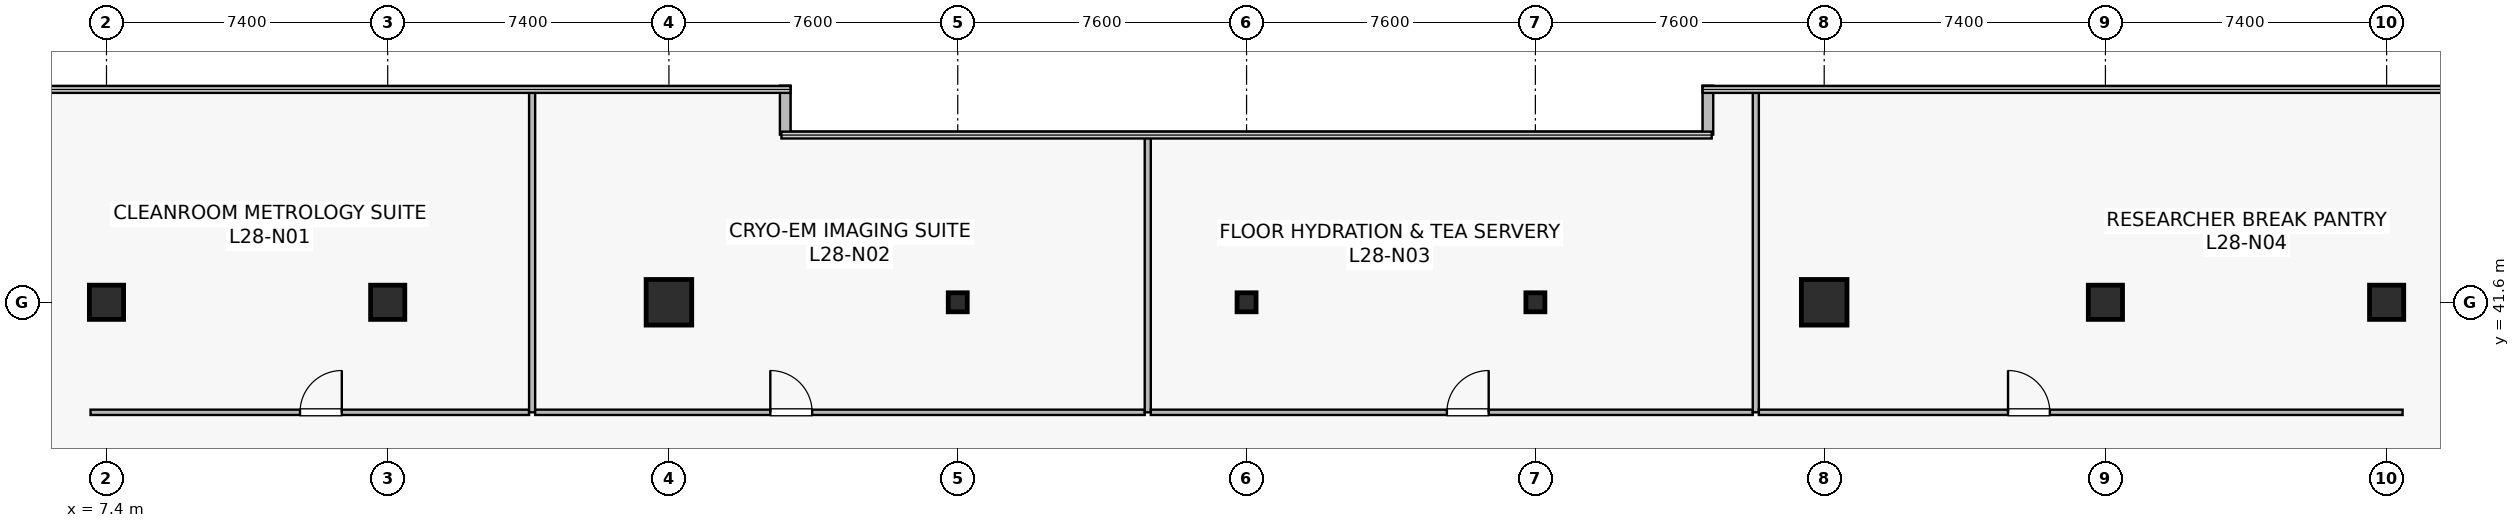
"""IFC4 building model, lengths in metres.
Left out: names, types, materials, properties, quantities, classifications, styles, units other than length and angle.
Written with IfcOpenShell. Run it as: python <this file> out.ifc"""

import sys

from ifc_helpers import new_model, si_unit, direction, frame, frame_2d, origin, origin_2d, place, context, subcontext, project, spatial, rectangle, hollow_rectangle, extrude, source, transform, mapped, element, fill, save


model = new_model("IFC4")
c1 = context("Model", 3, precision=1e-05, world=origin(), true_north=direction((0.0, 1.0)))
c2 = subcontext(c1, "Body", "Model", "MODEL_VIEW")
j1 = project(units=[si_unit("LENGTHUNIT", "METRE"), si_unit("PLANEANGLEUNIT", "RADIAN")], contexts=[c1])
p1 = place(None, origin())
s1 = spatial("IfcSite", under=j1, at=p1, CompositionType="ELEMENT")
p2 = place(p1, origin())
s2 = spatial("IfcBuilding", under=s1, at=p2, CompositionType="ELEMENT")
p3 = place(p2, frame((0.0, 0.0, 117.4)))
s3 = spatial("IfcBuildingStorey", under=s2, at=p3, CompositionType="ELEMENT", Elevation=117.4)
m1 = source(origin(), c2, "Body", "SweptSolid", [
    extrude(rectangle(XDim=0.9, YDim=0.9, at=origin_2d()), origin(), (0.0, 0.0, 1.0), 4.1),
])
p4 = place(p3, frame((14.8, 41.6, 0.0), z_axis=(0.0, 0.0, 1.0), x_axis=(1.0, 0.0, 0.0)))
e1 = element("IfcColumn", 1, at=p4, inside=s3, PredefinedType="COLUMN", context=c2, shape_type="MappedRepresentation", body=[
    mapped(m1, transform((0.0, 0.0, 0.0), scale=1.0)),
])
m2 = source(origin(), c2, "Body", "SweptSolid", [
    extrude(rectangle(XDim=1.2, YDim=1.2, at=origin_2d()), origin(), (0.0, 0.0, 1.0), 4.1),
])
for number, where, z_axis, x_axis in (
    (2, (22.2, 41.6, 0.0), (0.0, 0.0, 1.0), (1.0, 0.0, 0.0)),
    (3, (52.6, 41.6, 0.0), (0.0, 0.0, 1.0), (1.0, 0.0, 0.0)),
):
    element("IfcColumn", number, at=place(p3, frame(where, z_axis=z_axis, x_axis=x_axis)), inside=s3, PredefinedType="COLUMN", context=c2, shape_type="MappedRepresentation", body=[
        mapped(m2, transform((0.0, 0.0, 0.0), scale=1.0)),
    ])
for number, where, z_axis, x_axis in (
    (4, (60.0, 41.6, 0.0), (0.0, 0.0, 1.0), (1.0, 0.0, 0.0)),
    (5, (7.4, 41.6, 0.0), (0.0, 0.0, 1.0), (1.0, 0.0, 0.0)),
    (6, (67.4, 41.6, 0.0), (0.0, 0.0, 1.0), (1.0, 0.0, 0.0)),
):
    element("IfcColumn", number, at=place(p3, frame(where, z_axis=z_axis, x_axis=x_axis)), inside=s3, PredefinedType="COLUMN", context=c2, shape_type="MappedRepresentation", body=[
        mapped(m1, transform((0.0, 0.0, 0.0), scale=1.0)),
    ])
m3 = source(origin(), c2, "Body", "SweptSolid", [
    extrude(hollow_rectangle(XDim=0.5, YDim=0.5, WallThickness=0.022, at=origin_2d()), origin(), (0.0, 0.0, 1.0), 4.1),
])
for number, where, z_axis, x_axis in (
    (7, (29.8, 41.6, 0.0), (0.0, 0.0, 1.0), (1.0, 0.0, 0.0)),
    (8, (37.4, 41.6, 0.0), (0.0, 0.0, 1.0), (1.0, 0.0, 0.0)),
    (9, (45.0, 41.6, 0.0), (0.0, 0.0, 1.0), (1.0, 0.0, 0.0)),
):
    element("IfcColumn", number, at=place(p3, frame(where, z_axis=z_axis, x_axis=x_axis)), inside=s3, PredefinedType="COLUMN", context=c2, shape_type="MappedRepresentation", body=[
        mapped(m3, transform((0.0, 0.0, 0.0), scale=1.0)),
    ])
for number, where, z_axis, x_axis in (
    (10, (49.54, 47.3, 0.0), (0.0, 0.0, 1.0), (0.0, -1.0, 0.0)),
    (11, (25.26, 46.012, 0.0), (0.0, 0.0, 1.0), (0.0, 1.0, 0.0)),
):
    element("IfcWall", number, at=place(p3, frame(where, z_axis=z_axis, x_axis=x_axis)), inside=s3, PredefinedType="STANDARD", context=c2, shape_type="SweptSolid", body=[
        extrude(rectangle(XDim=1.288, YDim=0.28, at=frame_2d((0.644, 0.0))), origin(), (0.0, 0.0, 1.0), 3.79),
    ])
p5 = place(p3, frame((6.98, 38.705, 0.0), z_axis=(0.0, 0.0, 1.0), x_axis=(1.0, 0.0, 0.0)))
e12 = element("IfcWall", 12, at=p5, inside=s3, PredefinedType="PARTITIONING", context=c2, shape_type="SweptSolid", body=[
    extrude(rectangle(XDim=11.54, YDim=0.14, at=frame_2d((5.77, 0.0))), origin(), (0.0, 0.0, 1.0), 3.125),
])
p6 = place(p5, frame((5.512, 0.0, 0.0)))
e13 = element("IfcOpeningElement", 13, at=p6, cuts=e12, PredefinedType="OPENING", context=c2, shape_type="SweptSolid", body=[
    extrude(rectangle(XDim=1.1, YDim=2.18, at=frame_2d((0.55, 1.09))), frame((0.0, 0.08, 0.0), z_axis=(0.0, -1.0, 0.0), x_axis=(1.0, 0.0, 0.0)), (0.0, 0.0, 1.0), 0.16),
])
p7 = place(p3, frame((18.6, 38.705, 0.0), z_axis=(0.0, 0.0, 1.0), x_axis=(0.0, 1.0, 0.0)))
e14 = element("IfcWall", 14, at=p7, inside=s3, PredefinedType="PARTITIONING", context=c2, shape_type="SweptSolid", body=[
    extrude(rectangle(XDim=8.485, YDim=0.16, at=frame_2d((4.242, 0.0))), origin(), (0.0, 0.0, 1.0), 3.075),
])
p8 = place(p3, frame((18.68, 38.705, 0.0), z_axis=(0.0, 0.0, 1.0), x_axis=(1.0, 0.0, 0.0)))
e15 = element("IfcWall", 15, at=p8, inside=s3, PredefinedType="PARTITIONING", context=c2, shape_type="SweptSolid", body=[
    extrude(rectangle(XDim=16.04, YDim=0.14, at=frame_2d((8.02, 0.0))), origin(), (0.0, 0.0, 1.0), 3.125),
])
p9 = place(p8, frame((6.188, 0.0, 0.0)))
e16 = element("IfcOpeningElement", 16, at=p9, cuts=e15, PredefinedType="OPENING", context=c2, shape_type="SweptSolid", body=[
    extrude(rectangle(XDim=1.1, YDim=2.18, at=frame_2d((0.55, 1.09))), frame((0.0, 0.08, 0.0), z_axis=(0.0, -1.0, 0.0), x_axis=(1.0, 0.0, 0.0)), (0.0, 0.0, 1.0), 0.16),
])
p10 = place(p3, frame((34.8, 38.705, 0.0), z_axis=(0.0, 0.0, 1.0), x_axis=(0.0, 1.0, 0.0)))
e17 = element("IfcWall", 17, at=p10, inside=s3, PredefinedType="PARTITIONING", context=c2, shape_type="SweptSolid", body=[
    extrude(rectangle(XDim=7.285, YDim=0.16, at=frame_2d((3.643, 0.0))), origin(), (0.0, 0.0, 1.0), 3.075),
])
p11 = place(p3, frame((34.88, 38.705, 0.0), z_axis=(0.0, 0.0, 1.0), x_axis=(1.0, 0.0, 0.0)))
e18 = element("IfcWall", 18, at=p11, inside=s3, PredefinedType="PARTITIONING", context=c2, shape_type="SweptSolid", body=[
    extrude(rectangle(XDim=15.84, YDim=0.14, at=frame_2d((7.92, 0.0))), origin(), (0.0, 0.0, 1.0), 3.125),
])
p12 = place(p11, frame((7.791, 0.0, 0.0)))
e19 = element("IfcOpeningElement", 19, at=p12, cuts=e18, PredefinedType="OPENING", context=c2, shape_type="SweptSolid", body=[
    extrude(rectangle(XDim=1.1, YDim=2.18, at=frame_2d((0.55, 1.09))), frame((0.0, 0.08, 0.0), z_axis=(0.0, -1.0, 0.0), x_axis=(1.0, 0.0, 0.0)), (0.0, 0.0, 1.0), 0.16),
])
p13 = place(p3, frame((50.8, 38.705, 0.0), z_axis=(0.0, 0.0, 1.0), x_axis=(0.0, 1.0, 0.0)))
e20 = element("IfcWall", 20, at=p13, inside=s3, PredefinedType="PARTITIONING", context=c2, shape_type="SweptSolid", body=[
    extrude(rectangle(XDim=8.485, YDim=0.16, at=frame_2d((4.242, 0.0))), origin(), (0.0, 0.0, 1.0), 3.075),
])
p14 = place(p3, frame((50.88, 38.705, 0.0), z_axis=(0.0, 0.0, 1.0), x_axis=(1.0, 0.0, 0.0)))
e21 = element("IfcWall", 21, at=p14, inside=s3, PredefinedType="PARTITIONING", context=c2, shape_type="SweptSolid", body=[
    extrude(rectangle(XDim=16.94, YDim=0.14, at=frame_2d((8.47, 0.0))), origin(), (0.0, 0.0, 1.0), 3.125),
])
p15 = place(p14, frame((6.557, 0.0, 0.0)))
e22 = element("IfcOpeningElement", 22, at=p15, cuts=e21, PredefinedType="OPENING", context=c2, shape_type="SweptSolid", body=[
    extrude(rectangle(XDim=1.1, YDim=2.18, at=frame_2d((0.55, 1.09))), frame((0.0, 0.08, 0.0), z_axis=(0.0, -1.0, 0.0), x_axis=(1.0, 0.0, 0.0)), (0.0, 0.0, 1.0), 0.16),
])
m4 = source(origin(), c2, "Body", "SweptSolid", [
    extrude(rectangle(XDim=1.1, YDim=2.18, at=frame_2d((0.55, 1.09))), frame((0.0, 0.025, 0.0), z_axis=(0.0, -1.0, 0.0), x_axis=(1.0, 0.0, 0.0)), (0.0, 0.0, 1.0), 0.05),
])
p16 = place(p6, origin())
e23 = element("IfcDoor", 23, at=p16, inside=s3, OperationType="SINGLE_SWING_RIGHT", PredefinedType="DOOR", context=c2, shape_type="MappedRepresentation", body=[
    mapped(m4, transform((0.0, 0.0, 0.0), scale=1.0)),
])
fill(e13, e23)
p17 = place(p9, origin())
e24 = element("IfcDoor", 24, at=p17, inside=s3, OperationType="SINGLE_SWING_LEFT", PredefinedType="DOOR", context=c2, shape_type="MappedRepresentation", body=[
    mapped(m4, transform((0.0, 0.0, 0.0), scale=1.0)),
])
fill(e16, e24)
p18 = place(p12, origin())
e25 = element("IfcDoor", 25, at=p18, inside=s3, OperationType="SINGLE_SWING_RIGHT", PredefinedType="DOOR", context=c2, shape_type="MappedRepresentation", body=[
    mapped(m4, transform((0.0, 0.0, 0.0), scale=1.0)),
])
fill(e19, e25)
p19 = place(p15, origin())
e26 = element("IfcDoor", 26, at=p19, inside=s3, OperationType="SINGLE_SWING_LEFT", PredefinedType="DOOR", context=c2, shape_type="MappedRepresentation", body=[
    mapped(m4, transform((0.0, 0.0, 0.0), scale=1.0)),
])
fill(e22, e26)
save(model, sys.argv[1])
